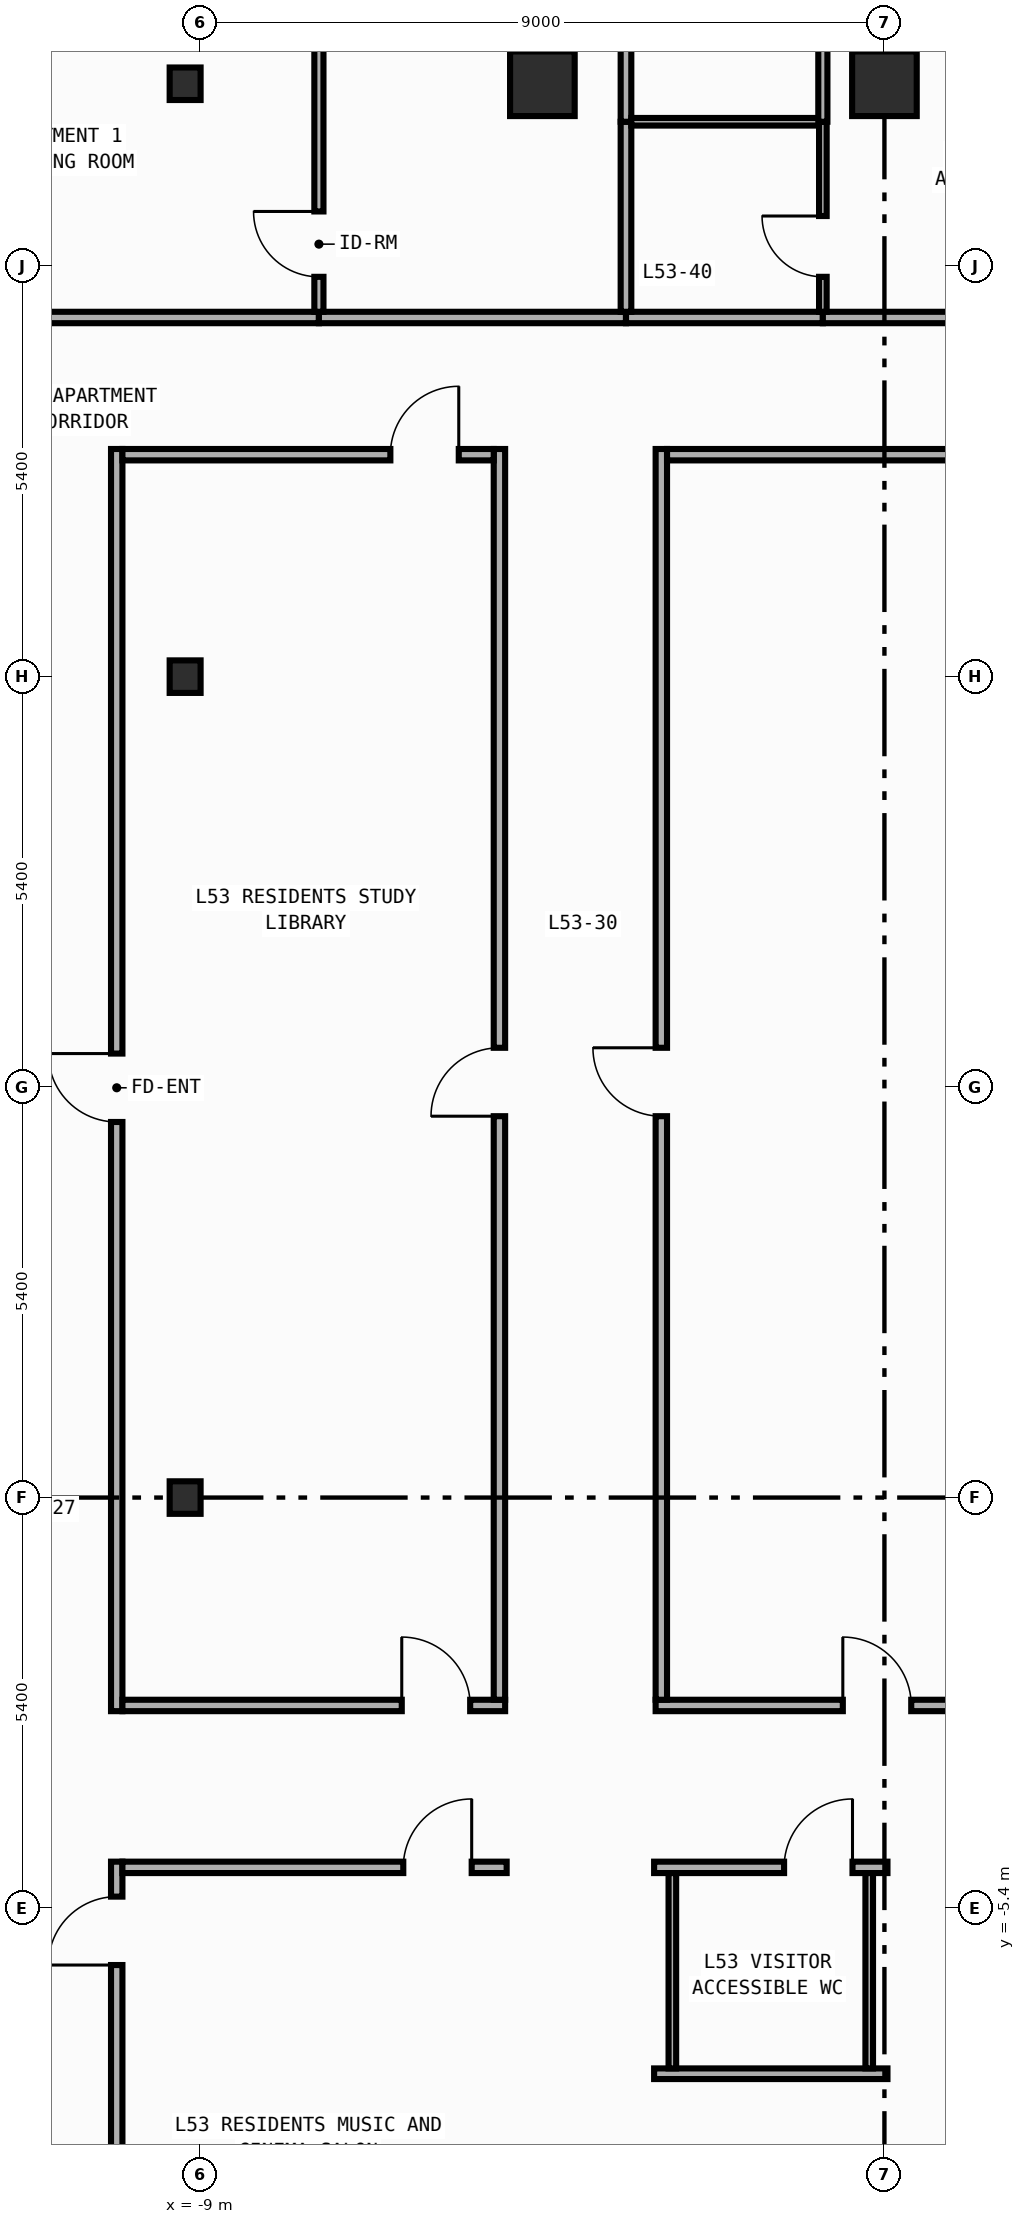
"""IFC4 building model, lengths in metres.
Left out: names, types, materials, properties, quantities, classifications, styles, units other than length and angle.
Written with IfcOpenShell. Run it as: python <this file> out.ifc"""

import sys

from ifc_helpers import new_model, si_unit, direction, frame, frame_2d, origin, origin_2d, place, context, subcontext, project, spatial, rectangle, i_section, extrude, element, fill, save


model = new_model("IFC4")
c1 = context("Model", 3, precision=1e-05, world=origin(), true_north=direction((0.0, 1.0)))
c2 = subcontext(c1, "Body", "Model", "MODEL_VIEW")
j1 = project(units=[si_unit("LENGTHUNIT", "METRE"), si_unit("PLANEANGLEUNIT", "RADIAN")], contexts=[c1])
p1 = place(None, origin())
s1 = spatial("IfcSite", under=j1, at=p1, CompositionType="ELEMENT")
p2 = place(p1, origin())
s2 = spatial("IfcBuilding", under=s1, at=p2, CompositionType="ELEMENT")
p3 = place(p2, frame((0.0, 0.0, 229.6)))
s3 = spatial("IfcBuildingStorey", under=s2, at=p3, CompositionType="ELEMENT", Elevation=229.6)
for number, where, z_axis, x_axis in (
    (1, (-9.2, 0.0, 0.0), (0.0, 0.0, 1.0), (1.0, 0.0, 0.0)),
    (2, (-9.2, 10.8, 0.0), (0.0, 0.0, 1.0), (1.0, 0.0, 0.0)),
    (3, (-9.2, 18.6, 0.0), (0.0, 0.0, 1.0), (1.0, 0.0, 0.0)),
):
    element("IfcColumn", number, at=place(p3, frame(where, z_axis=z_axis, x_axis=x_axis)), inside=s3, PredefinedType="COLUMN", context=c2, shape_type="SweptSolid", body=[
        extrude(i_section(OverallWidth=0.407, OverallDepth=0.428, WebThickness=0.02, FlangeThickness=0.035, FilletRadius=0.022, at=origin_2d()), origin(), (0.0, 0.0, 1.0), 3.6),
    ])
for number, where, z_axis, x_axis in (
    (4, (-4.5, 18.6, 0.0), (0.0, 0.0, 1.0), (1.0, 0.0, 0.0)),
    (5, (0.0, 18.6, 0.0), (0.0, 0.0, 1.0), (1.0, 0.0, 0.0)),
):
    element("IfcColumn", number, at=place(p3, frame(where, z_axis=z_axis, x_axis=x_axis)), inside=s3, PredefinedType="COLUMN", context=c2, shape_type="SweptSolid", body=[
        extrude(rectangle(XDim=0.85, YDim=0.85, at=origin_2d()), origin(), (0.0, 0.0, 1.0), 3.6),
    ])
p4 = place(p3, frame((-10.1, -2.81, 0.0), z_axis=(0.0, 0.0, 1.0), x_axis=(0.0, 1.0, 0.0)))
e6 = element("IfcWall", 6, at=p4, inside=s3, PredefinedType="PARTITIONING", context=c2, shape_type="SweptSolid", body=[
    extrude(rectangle(XDim=16.605, YDim=0.15, at=frame_2d((8.302, 0.0))), origin(), (0.0, 0.0, 1.0), 3.34),
])
p5 = place(p4, frame((7.751, 0.0, 0.0)))
e7 = element("IfcOpeningElement", 7, at=p5, cuts=e6, PredefinedType="OPENING", context=c2, shape_type="SweptSolid", body=[
    extrude(rectangle(XDim=0.9, YDim=2.15, at=frame_2d((0.45, 1.075))), frame((0.0, 0.085, 0.0), z_axis=(0.0, -1.0, 0.0), x_axis=(1.0, 0.0, 0.0)), (0.0, 0.0, 1.0), 0.17),
])
p6 = place(p3, frame((-10.1, -13.795, 0.0), z_axis=(0.0, 0.0, 1.0), x_axis=(0.0, 1.0, 0.0)))
e8 = element("IfcWall", 8, at=p6, inside=s3, PredefinedType="PARTITIONING", context=c2, shape_type="SweptSolid", body=[
    extrude(rectangle(XDim=9.005, YDim=0.15, at=frame_2d((4.502, 0.0))), origin(), (0.0, 0.0, 1.0), 3.34),
])
p7 = place(p6, frame((7.645, 0.0, 0.0)))
e9 = element("IfcOpeningElement", 9, at=p7, cuts=e8, PredefinedType="OPENING", context=c2, shape_type="SweptSolid", body=[
    extrude(rectangle(XDim=0.9, YDim=2.15, at=frame_2d((0.45, 1.075))), frame((0.0, 0.085, 0.0), z_axis=(0.0, -1.0, 0.0), x_axis=(1.0, 0.0, 0.0)), (0.0, 0.0, 1.0), 0.17),
])
p8 = place(p3, frame((-10.025, -2.735, 0.0), z_axis=(0.0, 0.0, 1.0), x_axis=(1.0, 0.0, 0.0)))
e10 = element("IfcWall", 10, at=p8, inside=s3, PredefinedType="PARTITIONING", context=c2, shape_type="SweptSolid", body=[
    extrude(rectangle(XDim=5.035, YDim=0.15, at=frame_2d((2.518, 0.0))), origin(), (0.0, 0.0, 1.0), 3.34),
])
p9 = place(p8, frame((3.675, 0.0, 0.0)))
e11 = element("IfcOpeningElement", 11, at=p9, cuts=e10, PredefinedType="OPENING", context=c2, shape_type="SweptSolid", body=[
    extrude(rectangle(XDim=0.9, YDim=2.15, at=frame_2d((0.45, 1.075))), frame((0.0, 0.085, 0.0), z_axis=(0.0, -1.0, 0.0), x_axis=(1.0, 0.0, 0.0)), (0.0, 0.0, 1.0), 0.17),
])
p10 = place(p3, frame((-10.025, -4.865, 0.0), z_axis=(0.0, 0.0, 1.0), x_axis=(1.0, 0.0, 0.0)))
e12 = element("IfcWall", 12, at=p10, inside=s3, PredefinedType="PARTITIONING", context=c2, shape_type="SweptSolid", body=[
    extrude(rectangle(XDim=5.055, YDim=0.15, at=frame_2d((2.527, 0.0))), origin(), (0.0, 0.0, 1.0), 3.34),
])
p11 = place(p10, frame((3.695, 0.0, 0.0)))
e13 = element("IfcOpeningElement", 13, at=p11, cuts=e12, PredefinedType="OPENING", context=c2, shape_type="SweptSolid", body=[
    extrude(rectangle(XDim=0.9, YDim=2.15, at=frame_2d((0.45, 1.075))), frame((0.0, 0.085, 0.0), z_axis=(0.0, -1.0, 0.0), x_axis=(1.0, 0.0, 0.0)), (0.0, 0.0, 1.0), 0.17),
])
p12 = place(p3, frame((-3.01, -2.735, 0.0), z_axis=(0.0, 0.0, 1.0), x_axis=(1.0, 0.0, 0.0)))
e14 = element("IfcWall", 14, at=p12, inside=s3, PredefinedType="PARTITIONING", context=c2, shape_type="SweptSolid", body=[
    extrude(rectangle(XDim=13.035, YDim=0.15, at=frame_2d((6.518, 0.0))), origin(), (0.0, 0.0, 1.0), 3.34),
])
p13 = place(p12, frame((2.463, 0.0, 0.0)))
e15 = element("IfcOpeningElement", 15, at=p13, cuts=e14, PredefinedType="OPENING", context=c2, shape_type="SweptSolid", body=[
    extrude(rectangle(XDim=0.9, YDim=2.15, at=frame_2d((0.45, 1.075))), frame((0.0, 0.085, 0.0), z_axis=(0.0, -1.0, 0.0), x_axis=(1.0, 0.0, 0.0)), (0.0, 0.0, 1.0), 0.17),
])
p14 = place(p3, frame((-3.03, -4.865, 0.0), z_axis=(0.0, 0.0, 1.0), x_axis=(1.0, 0.0, 0.0)))
e16 = element("IfcWall", 16, at=p14, inside=s3, PredefinedType="PARTITIONING", context=c2, shape_type="SweptSolid", body=[
    extrude(rectangle(XDim=3.07, YDim=0.15, at=frame_2d((1.535, 0.0))), origin(), (0.0, 0.0, 1.0), 3.34),
])
p15 = place(p14, frame((1.71, 0.0, 0.0)))
e17 = element("IfcOpeningElement", 17, at=p15, cuts=e16, PredefinedType="OPENING", context=c2, shape_type="SweptSolid", body=[
    extrude(rectangle(XDim=0.9, YDim=2.15, at=frame_2d((0.45, 1.075))), frame((0.0, 0.085, 0.0), z_axis=(0.0, -1.0, 0.0), x_axis=(1.0, 0.0, 0.0)), (0.0, 0.0, 1.0), 0.17),
])
p16 = place(p3, frame((-5.065, -2.66, 0.0), z_axis=(0.0, 0.0, 1.0), x_axis=(0.0, 1.0, 0.0)))
e18 = element("IfcWall", 18, at=p16, inside=s3, PredefinedType="PARTITIONING", context=c2, shape_type="SweptSolid", body=[
    extrude(rectangle(XDim=16.455, YDim=0.15, at=frame_2d((8.228, 0.0))), origin(), (0.0, 0.0, 1.0), 2.99),
])
p17 = place(p16, frame((7.677, 0.0, 0.0)))
e19 = element("IfcOpeningElement", 19, at=p17, cuts=e18, PredefinedType="OPENING", context=c2, shape_type="SweptSolid", body=[
    extrude(rectangle(XDim=0.9, YDim=2.15, at=frame_2d((0.45, 1.075))), frame((0.0, 0.085, 0.0), z_axis=(0.0, -1.0, 0.0), x_axis=(1.0, 0.0, 0.0)), (0.0, 0.0, 1.0), 0.17),
])
p18 = place(p3, frame((-2.935, -2.66, 0.0), z_axis=(0.0, 0.0, 1.0), x_axis=(0.0, 1.0, 0.0)))
e20 = element("IfcWall", 20, at=p18, inside=s3, PredefinedType="PARTITIONING", context=c2, shape_type="SweptSolid", body=[
    extrude(rectangle(XDim=16.455, YDim=0.15, at=frame_2d((8.228, 0.0))), origin(), (0.0, 0.0, 1.0), 3.34),
])
p19 = place(p18, frame((7.677, 0.0, 0.0)))
e21 = element("IfcOpeningElement", 21, at=p19, cuts=e20, PredefinedType="OPENING", context=c2, shape_type="SweptSolid", body=[
    extrude(rectangle(XDim=0.9, YDim=2.15, at=frame_2d((0.45, 1.075))), frame((0.0, 0.085, 0.0), z_axis=(0.0, -1.0, 0.0), x_axis=(1.0, 0.0, 0.0)), (0.0, 0.0, 1.0), 0.17),
])
p20 = place(p3, frame((-19.31, 15.525, 0.0), z_axis=(0.0, 0.0, 1.0), x_axis=(1.0, 0.0, 0.0)))
e22 = element("IfcWall", 22, at=p20, inside=s3, PredefinedType="PARTITIONING", context=c2, shape_type="SweptSolid", body=[
    extrude(rectangle(XDim=11.87, YDim=0.15, at=frame_2d((5.935, 0.0))), origin(), (0.0, 0.0, 1.0), 3.34),
])
p21 = place(p20, frame((1.465, 0.0, 0.0)))
e23 = element("IfcOpeningElement", 23, at=p21, cuts=e22, PredefinedType="OPENING", context=c2, shape_type="SweptSolid", body=[
    extrude(rectangle(XDim=0.9, YDim=2.15, at=frame_2d((0.45, 1.075))), frame((0.0, 0.085, 0.0), z_axis=(0.0, -1.0, 0.0), x_axis=(1.0, 0.0, 0.0)), (0.0, 0.0, 1.0), 0.17),
])
p22 = place(p3, frame((-7.44, 15.525, 0.0), z_axis=(0.0, 0.0, 1.0), x_axis=(1.0, 0.0, 0.0)))
e24 = element("IfcWall", 24, at=p22, inside=s3, PredefinedType="PARTITIONING", context=c2, shape_type="SweptSolid", body=[
    extrude(rectangle(XDim=4.04, YDim=0.15, at=frame_2d((2.02, 0.0))), origin(), (0.0, 0.0, 1.0), 3.34),
])
p23 = place(p3, frame((-3.4, 15.525, 0.0), z_axis=(0.0, 0.0, 1.0), x_axis=(1.0, 0.0, 0.0)))
e25 = element("IfcWall", 25, at=p23, inside=s3, PredefinedType="PARTITIONING", context=c2, shape_type="SweptSolid", body=[
    extrude(rectangle(XDim=2.59, YDim=0.15, at=frame_2d((1.295, 0.0))), origin(), (0.0, 0.0, 1.0), 3.34),
])
p24 = place(p3, frame((-0.81, 15.525, 0.0), z_axis=(0.0, 0.0, 1.0), x_axis=(1.0, 0.0, 0.0)))
e26 = element("IfcWall", 26, at=p24, inside=s3, PredefinedType="PARTITIONING", context=c2, shape_type="SweptSolid", body=[
    extrude(rectangle(XDim=11.37, YDim=0.15, at=frame_2d((5.685, 0.0))), origin(), (0.0, 0.0, 1.0), 3.34),
])
p25 = place(p24, frame((7.368, 0.0, 0.0)))
e27 = element("IfcOpeningElement", 27, at=p25, cuts=e26, PredefinedType="OPENING", context=c2, shape_type="SweptSolid", body=[
    extrude(rectangle(XDim=0.9, YDim=2.15, at=frame_2d((0.45, 1.075))), frame((0.0, 0.085, 0.0), z_axis=(0.0, -1.0, 0.0), x_axis=(1.0, 0.0, 0.0)), (0.0, 0.0, 1.0), 0.17),
])
p26 = place(p3, frame((-10.025, 13.72, 0.0), z_axis=(0.0, 0.0, 1.0), x_axis=(1.0, 0.0, 0.0)))
e28 = element("IfcWall", 28, at=p26, inside=s3, PredefinedType="PARTITIONING", context=c2, shape_type="SweptSolid", body=[
    extrude(rectangle(XDim=4.885, YDim=0.15, at=frame_2d((2.442, 0.0))), origin(), (0.0, 0.0, 1.0), 3.34),
])
p27 = place(p26, frame((3.525, 0.0, 0.0)))
e29 = element("IfcOpeningElement", 29, at=p27, cuts=e28, PredefinedType="OPENING", context=c2, shape_type="SweptSolid", body=[
    extrude(rectangle(XDim=0.9, YDim=2.15, at=frame_2d((0.45, 1.075))), frame((0.0, 0.085, 0.0), z_axis=(0.0, -1.0, 0.0), x_axis=(1.0, 0.0, 0.0)), (0.0, 0.0, 1.0), 0.17),
])
p28 = place(p3, frame((-2.86, 13.72, 0.0), z_axis=(0.0, 0.0, 1.0), x_axis=(1.0, 0.0, 0.0)))
e30 = element("IfcWall", 30, at=p28, inside=s3, PredefinedType="PARTITIONING", context=c2, shape_type="SweptSolid", body=[
    extrude(rectangle(XDim=12.885, YDim=0.15, at=frame_2d((6.442, 0.0))), origin(), (0.0, 0.0, 1.0), 3.34),
])
p29 = place(p28, frame((4.685, 0.0, 0.0)))
e31 = element("IfcOpeningElement", 31, at=p29, cuts=e30, PredefinedType="OPENING", context=c2, shape_type="SweptSolid", body=[
    extrude(rectangle(XDim=0.9, YDim=2.15, at=frame_2d((0.45, 1.075))), frame((0.0, 0.085, 0.0), z_axis=(0.0, -1.0, 0.0), x_axis=(1.0, 0.0, 0.0)), (0.0, 0.0, 1.0), 0.17),
])
p30 = place(p3, frame((-7.44, 15.6, 0.0), z_axis=(0.0, 0.0, 1.0), x_axis=(0.0, 1.0, 0.0)))
e32 = element("IfcWall", 32, at=p30, inside=s3, PredefinedType="PARTITIONING", context=c2, shape_type="SweptSolid", body=[
    extrude(rectangle(XDim=4.5, YDim=0.12, at=frame_2d((2.25, 0.0))), origin(), (0.0, 0.0, 1.0), 3.34),
])
p31 = place(p30, frame((0.46, 0.0, 0.0)))
e33 = element("IfcOpeningElement", 33, at=p31, cuts=e32, PredefinedType="OPENING", context=c2, shape_type="SweptSolid", body=[
    extrude(rectangle(XDim=0.86, YDim=2.15, at=frame_2d((0.43, 1.075))), frame((0.0, 0.07, 0.0), z_axis=(0.0, -1.0, 0.0), x_axis=(1.0, 0.0, 0.0)), (0.0, 0.0, 1.0), 0.14),
])
p32 = place(p3, frame((-3.4, 15.6, 0.0), z_axis=(0.0, 0.0, 1.0), x_axis=(0.0, 1.0, 0.0)))
e34 = element("IfcWall", 34, at=p32, inside=s3, PredefinedType="PARTITIONING", context=c2, shape_type="SweptSolid", body=[
    extrude(rectangle(XDim=2.5, YDim=0.14, at=frame_2d((1.25, 0.0))), origin(), (0.0, 0.0, 1.0), 3.34),
])
p33 = place(p3, frame((-3.4, 18.1, 0.0), z_axis=(0.0, 0.0, 1.0), x_axis=(0.0, 1.0, 0.0)))
e35 = element("IfcWall", 35, at=p33, inside=s3, PredefinedType="PARTITIONING", context=c2, shape_type="SweptSolid", body=[
    extrude(rectangle(XDim=6.755, YDim=0.14, at=frame_2d((3.377, 0.0))), origin(), (0.0, 0.0, 1.0), 3.34),
])
p34 = place(p3, frame((-3.33, 18.1, 0.0), z_axis=(0.0, 0.0, 1.0), x_axis=(1.0, 0.0, 0.0)))
e36 = element("IfcWall", 36, at=p34, inside=s3, PredefinedType="PARTITIONING", context=c2, shape_type="SweptSolid", body=[
    extrude(rectangle(XDim=2.47, YDim=0.1, at=frame_2d((1.235, 0.0))), origin(), (0.0, 0.0, 1.0), 3.34),
])
p35 = place(p3, frame((-0.81, 15.6, 0.0), z_axis=(0.0, 0.0, 1.0), x_axis=(0.0, 1.0, 0.0)))
e37 = element("IfcWall", 37, at=p35, inside=s3, PredefinedType="PARTITIONING", context=c2, shape_type="SweptSolid", body=[
    extrude(rectangle(XDim=2.5, YDim=0.1, at=frame_2d((1.25, 0.0))), origin(), (0.0, 0.0, 1.0), 3.34),
])
p36 = place(p35, frame((0.46, 0.0, 0.0)))
e38 = element("IfcOpeningElement", 38, at=p36, cuts=e37, PredefinedType="OPENING", context=c2, shape_type="SweptSolid", body=[
    extrude(rectangle(XDim=0.8, YDim=2.1, at=frame_2d((0.4, 1.05))), frame((0.0, 0.06, 0.0), z_axis=(0.0, -1.0, 0.0), x_axis=(1.0, 0.0, 0.0)), (0.0, 0.0, 1.0), 0.12),
])
p37 = place(p3, frame((-0.81, 18.1, 0.0), z_axis=(0.0, 0.0, 1.0), x_axis=(0.0, 1.0, 0.0)))
e39 = element("IfcWall", 39, at=p37, inside=s3, PredefinedType="PARTITIONING", context=c2, shape_type="SweptSolid", body=[
    extrude(rectangle(XDim=2.0, YDim=0.12, at=frame_2d((1.0, 0.0))), origin(), (0.0, 0.0, 1.0), 3.34),
])
p38 = place(p3, frame((-3.03, -7.58, 0.0), z_axis=(0.0, 0.0, 1.0), x_axis=(1.0, 0.0, 0.0)))
e40 = element("IfcWall", 40, at=p38, inside=s3, PredefinedType="PARTITIONING", context=c2, shape_type="SweptSolid", body=[
    extrude(rectangle(XDim=3.07, YDim=0.14, at=frame_2d((1.535, 0.0))), origin(), (0.0, 0.0, 1.0), 3.34),
])
for number, where, z_axis, x_axis in (
    (41, (-0.2, -4.94, 0.0), (0.0, 0.0, 1.0), (0.0, -1.0, 0.0)),
    (42, (-2.79, -7.51, 0.0), (0.0, 0.0, 1.0), (0.0, 1.0, 0.0)),
):
    element("IfcWall", number, at=place(p3, frame(where, z_axis=z_axis, x_axis=x_axis)), inside=s3, PredefinedType="PARTITIONING", context=c2, shape_type="SweptSolid", body=[
        extrude(rectangle(XDim=2.57, YDim=0.1, at=frame_2d((1.285, 0.0))), origin(), (0.0, 0.0, 1.0), 3.34),
    ])
p39 = place(p5, origin())
e43 = element("IfcDoor", 43, at=p39, inside=s3, OperationType="SINGLE_SWING_RIGHT", PredefinedType="DOOR", context=c2, shape_type="SweptSolid", body=[
    extrude(rectangle(XDim=0.9, YDim=2.15, at=frame_2d((0.45, 1.075))), frame((0.0, 0.025, 0.0), z_axis=(0.0, -1.0, 0.0), x_axis=(1.0, 0.0, 0.0)), (0.0, 0.0, 1.0), 0.05),
])
fill(e7, e43)
p40 = place(p7, origin())
e44 = element("IfcDoor", 44, at=p40, inside=s3, OperationType="SINGLE_SWING_LEFT", PredefinedType="DOOR", context=c2, shape_type="SweptSolid", body=[
    extrude(rectangle(XDim=0.9, YDim=2.15, at=frame_2d((0.45, 1.075))), frame((0.0, 0.025, 0.0), z_axis=(0.0, -1.0, 0.0), x_axis=(1.0, 0.0, 0.0)), (0.0, 0.0, 1.0), 0.05),
])
fill(e9, e44)
p41 = place(p9, origin())
e45 = element("IfcDoor", 45, at=p41, inside=s3, OperationType="SINGLE_SWING_LEFT", PredefinedType="DOOR", context=c2, shape_type="SweptSolid", body=[
    extrude(rectangle(XDim=0.9, YDim=2.15, at=frame_2d((0.45, 1.075))), frame((0.0, 0.025, 0.0), z_axis=(0.0, -1.0, 0.0), x_axis=(1.0, 0.0, 0.0)), (0.0, 0.0, 1.0), 0.05),
])
fill(e11, e45)
p42 = place(p11, origin())
e46 = element("IfcDoor", 46, at=p42, inside=s3, OperationType="SINGLE_SWING_RIGHT", PredefinedType="DOOR", context=c2, shape_type="SweptSolid", body=[
    extrude(rectangle(XDim=0.9, YDim=2.15, at=frame_2d((0.45, 1.075))), frame((0.0, 0.025, 0.0), z_axis=(0.0, -1.0, 0.0), x_axis=(1.0, 0.0, 0.0)), (0.0, 0.0, 1.0), 0.05),
])
fill(e13, e46)
p43 = place(p13, origin())
e47 = element("IfcDoor", 47, at=p43, inside=s3, OperationType="SINGLE_SWING_LEFT", PredefinedType="DOOR", context=c2, shape_type="SweptSolid", body=[
    extrude(rectangle(XDim=0.9, YDim=2.15, at=frame_2d((0.45, 1.075))), frame((0.0, 0.025, 0.0), z_axis=(0.0, -1.0, 0.0), x_axis=(1.0, 0.0, 0.0)), (0.0, 0.0, 1.0), 0.05),
])
fill(e15, e47)
p44 = place(p15, origin())
e48 = element("IfcDoor", 48, at=p44, inside=s3, OperationType="SINGLE_SWING_RIGHT", PredefinedType="DOOR", context=c2, shape_type="SweptSolid", body=[
    extrude(rectangle(XDim=0.9, YDim=2.15, at=frame_2d((0.45, 1.075))), frame((0.0, 0.025, 0.0), z_axis=(0.0, -1.0, 0.0), x_axis=(1.0, 0.0, 0.0)), (0.0, 0.0, 1.0), 0.05),
])
fill(e17, e48)
p45 = place(p17, origin())
e49 = element("IfcDoor", 49, at=p45, inside=s3, OperationType="SINGLE_SWING_LEFT", PredefinedType="DOOR", context=c2, shape_type="SweptSolid", body=[
    extrude(rectangle(XDim=0.9, YDim=2.15, at=frame_2d((0.45, 1.075))), frame((0.0, 0.025, 0.0), z_axis=(0.0, -1.0, 0.0), x_axis=(1.0, 0.0, 0.0)), (0.0, 0.0, 1.0), 0.05),
])
fill(e19, e49)
p46 = place(p19, origin())
e50 = element("IfcDoor", 50, at=p46, inside=s3, OperationType="SINGLE_SWING_RIGHT", PredefinedType="DOOR", context=c2, shape_type="SweptSolid", body=[
    extrude(rectangle(XDim=0.9, YDim=2.15, at=frame_2d((0.45, 1.075))), frame((0.0, 0.025, 0.0), z_axis=(0.0, -1.0, 0.0), x_axis=(1.0, 0.0, 0.0)), (0.0, 0.0, 1.0), 0.05),
])
fill(e21, e50)
p47 = place(p27, origin())
e51 = element("IfcDoor", 51, at=p47, inside=s3, OperationType="SINGLE_SWING_RIGHT", PredefinedType="DOOR", context=c2, shape_type="SweptSolid", body=[
    extrude(rectangle(XDim=0.9, YDim=2.15, at=frame_2d((0.45, 1.075))), frame((0.0, 0.025, 0.0), z_axis=(0.0, -1.0, 0.0), x_axis=(1.0, 0.0, 0.0)), (0.0, 0.0, 1.0), 0.05),
])
fill(e29, e51)
p48 = place(p31, origin())
e52 = element("IfcDoor", 52, at=p48, inside=s3, OperationType="SINGLE_SWING_RIGHT", PredefinedType="DOOR", context=c2, shape_type="SweptSolid", body=[
    extrude(rectangle(XDim=0.86, YDim=2.15, at=frame_2d((0.43, 1.075))), frame((0.0, 0.025, 0.0), z_axis=(0.0, -1.0, 0.0), x_axis=(1.0, 0.0, 0.0)), (0.0, 0.0, 1.0), 0.05),
])
fill(e33, e52)
p49 = place(p36, origin())
e53 = element("IfcDoor", 53, at=p49, inside=s3, OperationType="SINGLE_SWING_RIGHT", PredefinedType="DOOR", context=c2, shape_type="SweptSolid", body=[
    extrude(rectangle(XDim=0.8, YDim=2.1, at=frame_2d((0.4, 1.05))), frame((0.0, 0.025, 0.0), z_axis=(0.0, -1.0, 0.0), x_axis=(1.0, 0.0, 0.0)), (0.0, 0.0, 1.0), 0.05),
])
fill(e38, e53)
save(model, sys.argv[1])
